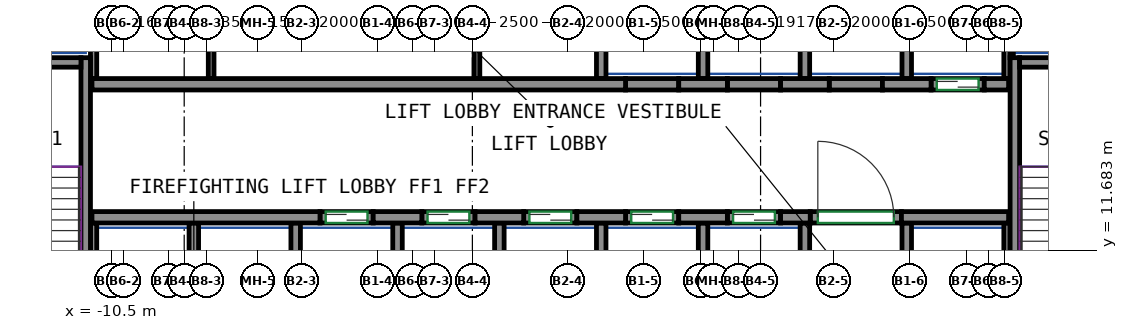
"""IFC4 building model, lengths in metres.
Left out: names, types, materials, properties, quantities, classifications, styles, units other than length and angle.
Written with IfcOpenShell. Run it as: python <this file> out.ifc"""

import sys

from ifc_helpers import new_model, si_unit, direction, frame, frame_2d, origin, place, context, subcontext, project, spatial, rectangle, extrude, source, transform, mapped, element, fill, save


model = new_model("IFC4")
c1 = context("Model", 3, precision=1e-05, world=origin(), true_north=direction((0.0, 1.0)))
c2 = subcontext(c1, "Body", "Model", "MODEL_VIEW")
j1 = project(units=[si_unit("LENGTHUNIT", "METRE"), si_unit("PLANEANGLEUNIT", "RADIAN")], contexts=[c1])
p1 = place(None, origin())
s1 = spatial("IfcSite", under=j1, at=p1, CompositionType="ELEMENT")
p2 = place(p1, origin())
s2 = spatial("IfcBuilding", under=s1, at=p2, CompositionType="ELEMENT")
p3 = place(p2, frame((0.0, 0.0, 164.3)))
s3 = spatial("IfcBuildingStorey", under=s2, at=p3, CompositionType="ELEMENT", Elevation=164.3)
m1 = source(origin(), c2, "Body", "SweptSolid", [
    extrude(rectangle(XDim=7.75, YDim=0.25, at=frame_2d((3.875, 0.0))), origin(), (0.0, 0.0, 1.0), 3.8),
])
p4 = place(p3, frame((-11.175, 9.0, 0.0), z_axis=(0.0, 0.0, 1.0), x_axis=(0.0, 1.0, 0.0)))
e1 = element("IfcWall", 1, at=p4, inside=s3, PredefinedType="SHEAR", context=c2, shape_type="MappedRepresentation", body=[
    mapped(m1, transform((0.0, 0.0, 0.0))),
])
m2 = source(origin(), c2, "Body", "SweptSolid", [
    extrude(rectangle(XDim=3.7, YDim=0.25, at=frame_2d((1.85, 0.0))), origin(), (0.0, 0.0, 1.0), 3.8),
])
p5 = place(p3, frame((-15.0, 16.625, 0.0), z_axis=(0.0, 0.0, 1.0), x_axis=(1.0, 0.0, 0.0)))
e2 = element("IfcWall", 2, at=p5, inside=s3, PredefinedType="SHEAR", context=c2, shape_type="MappedRepresentation", body=[
    mapped(m2, transform((0.0, 0.0, 0.0))),
])
p6 = place(p3, frame((13.275, 9.0, 0.0), z_axis=(0.0, 0.0, 1.0), x_axis=(0.0, 1.0, 0.0)))
e3 = element("IfcWall", 3, at=p6, inside=s3, PredefinedType="SHEAR", context=c2, shape_type="MappedRepresentation", body=[
    mapped(m1, transform((0.0, 0.0, 0.0))),
])
m3 = source(origin(), c2, "Body", "SweptSolid", [
    extrude(rectangle(XDim=3.7, YDim=0.25, at=frame_2d((1.85, 0.0))), origin(), (0.0, 0.0, 1.0), 3.8),
])
p7 = place(p3, frame((13.4, 16.625, 0.0), z_axis=(0.0, 0.0, 1.0), x_axis=(1.0, 0.0, 0.0)))
e4 = element("IfcWall", 4, at=p7, inside=s3, PredefinedType="SHEAR", context=c2, shape_type="MappedRepresentation", body=[
    mapped(m3, transform((0.0, 0.0, 0.0))),
])
m4 = source(origin(), c2, "Body", "SweptSolid", [
    extrude(rectangle(XDim=6.0, YDim=0.3, at=frame_2d((3.0, 0.0))), origin(), (0.0, 0.0, 1.0), 3.8),
])
p8 = place(p3, frame((-11.01, 12.55, 0.0), z_axis=(0.0, 0.0, 1.0), x_axis=(1.0, 0.0, 0.0)))
e5 = element("IfcWall", 5, at=p8, inside=s3, PredefinedType="SHEAR", context=c2, shape_type="MappedRepresentation", body=[
    mapped(m4, transform((0.0, 0.0, 0.0))),
])
m5 = source(origin(), c2, "Body", "SweptSolid", [
    extrude(rectangle(XDim=1.28, YDim=0.3, at=frame_2d((0.64, 0.0))), origin(), (0.0, 0.0, 1.0), 3.8),
])
for number, where, z_axis, x_axis in (
    (6, (-3.61, 12.55, 0.0), (0.0, 0.0, 1.0), (1.0, 0.0, 0.0)),
    (7, (-0.93, 12.55, 0.0), (0.0, 0.0, 1.0), (1.0, 0.0, 0.0)),
    (8, (1.75, 12.55, 0.0), (0.0, 0.0, 1.0), (1.0, 0.0, 0.0)),
    (9, (4.43, 12.55, 0.0), (0.0, 0.0, 1.0), (1.0, 0.0, 0.0)),
):
    element("IfcWall", number, at=place(p3, frame(where, z_axis=z_axis, x_axis=x_axis)), inside=s3, PredefinedType="SHEAR", context=c2, shape_type="MappedRepresentation", body=[
        mapped(m5, transform((0.0, 0.0, 0.0))),
    ])
m6 = source(origin(), c2, "Body", "SweptSolid", [
    extrude(rectangle(XDim=0.78, YDim=0.3, at=frame_2d((0.39, 0.0))), origin(), (0.0, 0.0, 1.0), 3.8),
])
p9 = place(p3, frame((7.11, 12.55, 0.0), z_axis=(0.0, 0.0, 1.0), x_axis=(1.0, 0.0, 0.0)))
e10 = element("IfcWall", 10, at=p9, inside=s3, PredefinedType="SHEAR", context=c2, shape_type="MappedRepresentation", body=[
    mapped(m6, transform((0.0, 0.0, 0.0))),
])
m7 = source(origin(), c2, "Body", "SweptSolid", [
    extrude(rectangle(XDim=2.82, YDim=0.3, at=frame_2d((1.41, 0.0))), origin(), (0.0, 0.0, 1.0), 3.8),
])
p10 = place(p3, frame((10.29, 12.55, 0.0), z_axis=(0.0, 0.0, 1.0), x_axis=(1.0, 0.0, 0.0)))
e11 = element("IfcWall", 11, at=p10, inside=s3, PredefinedType="SHEAR", context=c2, shape_type="MappedRepresentation", body=[
    mapped(m7, transform((0.0, 0.0, 0.0))),
])
m8 = source(origin(), c2, "Body", "SweptSolid", [
    extrude(rectangle(XDim=14.04, YDim=0.3, at=frame_2d((7.02, 0.0))), origin(), (0.0, 0.0, 1.0), 3.8),
])
p11 = place(p3, frame((-11.01, 16.05, 0.0), z_axis=(0.0, 0.0, 1.0), x_axis=(1.0, 0.0, 0.0)))
e12 = element("IfcWall", 12, at=p11, inside=s3, PredefinedType="SHEAR", context=c2, shape_type="MappedRepresentation", body=[
    mapped(m8, transform((0.0, 0.0, 0.0))),
])
p12 = place(p3, frame((4.43, 16.05, 0.0), z_axis=(0.0, 0.0, 1.0), x_axis=(1.0, 0.0, 0.0)))
e13 = element("IfcWall", 13, at=p12, inside=s3, PredefinedType="SHEAR", context=c2, shape_type="MappedRepresentation", body=[
    mapped(m5, transform((0.0, 0.0, 0.0))),
])
m9 = source(origin(), c2, "Body", "SweptSolid", [
    extrude(rectangle(XDim=1.28, YDim=0.3, at=frame_2d((0.64, 0.0))), origin(), (0.0, 0.0, 1.0), 3.8),
])
p13 = place(p3, frame((7.11, 16.05, 0.0), z_axis=(0.0, 0.0, 1.0), x_axis=(1.0, 0.0, 0.0)))
e14 = element("IfcWall", 14, at=p13, inside=s3, PredefinedType="SHEAR", context=c2, shape_type="MappedRepresentation", body=[
    mapped(m9, transform((0.0, 0.0, 0.0))),
])
p14 = place(p3, frame((9.79, 16.05, 0.0), z_axis=(0.0, 0.0, 1.0), x_axis=(1.0, 0.0, 0.0)))
e15 = element("IfcWall", 15, at=p14, inside=s3, PredefinedType="SHEAR", context=c2, shape_type="MappedRepresentation", body=[
    mapped(m5, transform((0.0, 0.0, 0.0))),
])
m10 = source(origin(), c2, "Body", "SweptSolid", [
    extrude(rectangle(XDim=0.64, YDim=0.3, at=frame_2d((0.32, 0.0))), origin(), (0.0, 0.0, 1.0), 3.8),
])
p15 = place(p3, frame((12.47, 16.05, 0.0), z_axis=(0.0, 0.0, 1.0), x_axis=(1.0, 0.0, 0.0)))
e16 = element("IfcWall", 16, at=p15, inside=s3, PredefinedType="SHEAR", context=c2, shape_type="MappedRepresentation", body=[
    mapped(m10, transform((0.0, 0.0, 0.0))),
])
m11 = source(origin(), c2, "Body", "SweptSolid", [
    extrude(rectangle(XDim=1.4, YDim=0.3, at=frame_2d((0.7, 0.0))), origin(), (0.0, 0.0, 1.0), 3.8),
])
p16 = place(p3, frame((-5.01, 12.55, 0.0), z_axis=(0.0, 0.0, 1.0), x_axis=(1.0, 0.0, 0.0)))
e17 = element("IfcWall", 17, at=p16, inside=s3, PredefinedType="PARTITIONING", context=c2, shape_type="MappedRepresentation", body=[
    mapped(m11, transform((0.0, 0.0, 0.0))),
])
p17 = place(p16, frame((0.15, 0.0, 0.0)))
e18 = element("IfcOpeningElement", 18, at=p17, cuts=e17, PredefinedType="OPENING", context=c2, shape_type="SweptSolid", body=[
    extrude(rectangle(XDim=1.1, YDim=2.1, at=frame_2d((0.55, 1.05))), frame((0.0, 0.16, 0.0), z_axis=(0.0, -1.0, 0.0), x_axis=(1.0, 0.0, 0.0)), (0.0, 0.0, 1.0), 0.32),
])
m12 = source(origin(), c2, "Body", "SweptSolid", [
    extrude(rectangle(XDim=1.4, YDim=0.3, at=frame_2d((0.7, 0.0))), origin(), (0.0, 0.0, 1.0), 3.8),
])
p18 = place(p3, frame((-2.33, 12.55, 0.0), z_axis=(0.0, 0.0, 1.0), x_axis=(1.0, 0.0, 0.0)))
e19 = element("IfcWall", 19, at=p18, inside=s3, PredefinedType="PARTITIONING", context=c2, shape_type="MappedRepresentation", body=[
    mapped(m12, transform((0.0, 0.0, 0.0))),
])
p19 = place(p18, frame((0.15, 0.0, 0.0)))
e20 = element("IfcOpeningElement", 20, at=p19, cuts=e19, PredefinedType="OPENING", context=c2, shape_type="SweptSolid", body=[
    extrude(rectangle(XDim=1.1, YDim=2.1, at=frame_2d((0.55, 1.05))), frame((0.0, 0.16, 0.0), z_axis=(0.0, -1.0, 0.0), x_axis=(1.0, 0.0, 0.0)), (0.0, 0.0, 1.0), 0.32),
])
p20 = place(p3, frame((0.35, 12.55, 0.0), z_axis=(0.0, 0.0, 1.0), x_axis=(1.0, 0.0, 0.0)))
e21 = element("IfcWall", 21, at=p20, inside=s3, PredefinedType="PARTITIONING", context=c2, shape_type="MappedRepresentation", body=[
    mapped(m11, transform((0.0, 0.0, 0.0))),
])
p21 = place(p20, frame((0.15, 0.0, 0.0)))
e22 = element("IfcOpeningElement", 22, at=p21, cuts=e21, PredefinedType="OPENING", context=c2, shape_type="SweptSolid", body=[
    extrude(rectangle(XDim=1.1, YDim=2.1, at=frame_2d((0.55, 1.05))), frame((0.0, 0.16, 0.0), z_axis=(0.0, -1.0, 0.0), x_axis=(1.0, 0.0, 0.0)), (0.0, 0.0, 1.0), 0.32),
])
p22 = place(p3, frame((3.03, 12.55, 0.0), z_axis=(0.0, 0.0, 1.0), x_axis=(1.0, 0.0, 0.0)))
e23 = element("IfcWall", 23, at=p22, inside=s3, PredefinedType="PARTITIONING", context=c2, shape_type="MappedRepresentation", body=[
    mapped(m11, transform((0.0, 0.0, 0.0))),
])
p23 = place(p22, frame((0.15, 0.0, 0.0)))
e24 = element("IfcOpeningElement", 24, at=p23, cuts=e23, PredefinedType="OPENING", context=c2, shape_type="SweptSolid", body=[
    extrude(rectangle(XDim=1.1, YDim=2.1, at=frame_2d((0.55, 1.05))), frame((0.0, 0.16, 0.0), z_axis=(0.0, -1.0, 0.0), x_axis=(1.0, 0.0, 0.0)), (0.0, 0.0, 1.0), 0.32),
])
p24 = place(p3, frame((5.71, 12.55, 0.0), z_axis=(0.0, 0.0, 1.0), x_axis=(1.0, 0.0, 0.0)))
e25 = element("IfcWall", 25, at=p24, inside=s3, PredefinedType="PARTITIONING", context=c2, shape_type="MappedRepresentation", body=[
    mapped(m12, transform((0.0, 0.0, 0.0))),
])
p25 = place(p24, frame((0.15, 0.0, 0.0)))
e26 = element("IfcOpeningElement", 26, at=p25, cuts=e25, PredefinedType="OPENING", context=c2, shape_type="SweptSolid", body=[
    extrude(rectangle(XDim=1.1, YDim=2.1, at=frame_2d((0.55, 1.05))), frame((0.0, 0.16, 0.0), z_axis=(0.0, -1.0, 0.0), x_axis=(1.0, 0.0, 0.0)), (0.0, 0.0, 1.0), 0.32),
])
p26 = place(p3, frame((11.07, 16.05, 0.0), z_axis=(0.0, 0.0, 1.0), x_axis=(1.0, 0.0, 0.0)))
e27 = element("IfcWall", 27, at=p26, inside=s3, PredefinedType="PARTITIONING", context=c2, shape_type="MappedRepresentation", body=[
    mapped(m11, transform((0.0, 0.0, 0.0))),
])
p27 = place(p26, frame((0.15, 0.0, 0.0)))
e28 = element("IfcOpeningElement", 28, at=p27, cuts=e27, PredefinedType="OPENING", context=c2, shape_type="SweptSolid", body=[
    extrude(rectangle(XDim=1.1, YDim=2.1, at=frame_2d((0.55, 1.05))), frame((0.0, 0.16, 0.0), z_axis=(0.0, -1.0, 0.0), x_axis=(1.0, 0.0, 0.0)), (0.0, 0.0, 1.0), 0.32),
])
m13 = source(origin(), c2, "Body", "SweptSolid", [
    extrude(rectangle(XDim=2.4, YDim=0.3, at=frame_2d((1.2, 0.0))), origin(), (0.0, 0.0, 1.0), 3.8),
])
p28 = place(p3, frame((7.89, 12.55, 0.0), z_axis=(0.0, 0.0, 1.0), x_axis=(1.0, 0.0, 0.0)))
e29 = element("IfcWall", 29, at=p28, inside=s3, PredefinedType="PARTITIONING", context=c2, shape_type="MappedRepresentation", body=[
    mapped(m13, transform((0.0, 0.0, 0.0))),
])
p29 = place(p28, frame((0.2, 0.0, 0.0)))
e30 = element("IfcOpeningElement", 30, at=p29, cuts=e29, PredefinedType="OPENING", context=c2, shape_type="SweptSolid", body=[
    extrude(rectangle(XDim=2.0, YDim=2.1, at=frame_2d((1.0, 1.05))), frame((0.0, 0.16, 0.0), z_axis=(0.0, -1.0, 0.0), x_axis=(1.0, 0.0, 0.0)), (0.0, 0.0, 1.0), 0.32),
])
p30 = place(p3, frame((3.03, 16.05, 0.0), z_axis=(0.0, 0.0, 1.0), x_axis=(1.0, 0.0, 0.0)))
e31 = element("IfcWall", 31, at=p30, inside=s3, PredefinedType="PARTITIONING", context=c2, shape_type="MappedRepresentation", body=[
    mapped(m11, transform((0.0, 0.0, 0.0))),
])
for number, where, z_axis, x_axis in (
    (32, (5.71, 16.05, 0.0), (0.0, 0.0, 1.0), (1.0, 0.0, 0.0)),
    (33, (8.39, 16.05, 0.0), (0.0, 0.0, 1.0), (1.0, 0.0, 0.0)),
):
    element("IfcWall", number, at=place(p3, frame(where, z_axis=z_axis, x_axis=x_axis)), inside=s3, PredefinedType="PARTITIONING", context=c2, shape_type="MappedRepresentation", body=[
        mapped(m12, transform((0.0, 0.0, 0.0))),
    ])
m14 = source(origin(), c2, "Body", "SweptSolid", [
    extrude(rectangle(XDim=3.275, YDim=0.165, at=frame_2d((1.638, 0.0))), origin(), (0.0, 0.0, 1.0), 3.8),
])
p31 = place(p3, frame((13.067, 16.2, 0.0), z_axis=(0.0, 0.0, 1.0), x_axis=(0.0, 1.0, 0.0)))
e34 = element("IfcWall", 34, at=p31, inside=s3, PredefinedType="PARTITIONING", context=c2, shape_type="MappedRepresentation", body=[
    mapped(m14, transform((0.0, 0.0, 0.0))),
])
m15 = source(origin(), c2, "Body", "SweptSolid", [
    extrude(rectangle(XDim=4.8, YDim=0.165, at=frame_2d((2.4, 0.0))), origin(), (0.0, 0.0, 1.0), 3.8),
])
p32 = place(p3, frame((-10.968, 16.2, 0.0), z_axis=(0.0, 0.0, 1.0), x_axis=(0.0, 1.0, 0.0)))
e35 = element("IfcWall", 35, at=p32, inside=s3, PredefinedType="PARTITIONING", context=c2, shape_type="MappedRepresentation", body=[
    mapped(m15, transform((0.0, 0.0, 0.0))),
])
m16 = source(origin(), c2, "Body", "SweptSolid", [
    extrude(rectangle(XDim=3.275, YDim=0.25, at=frame_2d((1.638, 0.0))), origin(), (0.0, 0.0, 1.0), 3.8),
])
p33 = place(p3, frame((10.43, 16.2, 0.0), z_axis=(0.0, 0.0, 1.0), x_axis=(0.0, 1.0, 0.0)))
e36 = element("IfcWall", 36, at=p33, inside=s3, PredefinedType="PARTITIONING", context=c2, shape_type="MappedRepresentation", body=[
    mapped(m16, transform((0.0, 0.0, 0.0))),
])
m17 = source(origin(), c2, "Body", "SweptSolid", [
    extrude(rectangle(XDim=2.725, YDim=0.085, at=frame_2d((1.363, 0.0))), origin(), (0.0, 0.0, 1.0), 3.8),
])
p34 = place(p3, frame((13.192, 16.75, 0.0), z_axis=(0.0, 0.0, 1.0), x_axis=(0.0, 1.0, 0.0)))
e37 = element("IfcWall", 37, at=p34, inside=s3, PredefinedType="PARTITIONING", context=c2, shape_type="MappedRepresentation", body=[
    mapped(m17, transform((0.0, 0.0, 0.0))),
])
for number, where, z_axis, x_axis in (
    (38, (2.39, 16.2, 0.0), (0.0, 0.0, 1.0), (0.0, 1.0, 0.0)),
    (39, (5.07, 16.2, 0.0), (0.0, 0.0, 1.0), (0.0, 1.0, 0.0)),
    (40, (7.75, 16.2, 0.0), (0.0, 0.0, 1.0), (0.0, 1.0, 0.0)),
):
    element("IfcWall", number, at=place(p3, frame(where, z_axis=z_axis, x_axis=x_axis)), inside=s3, PredefinedType="PARTITIONING", context=c2, shape_type="MappedRepresentation", body=[
        mapped(m16, transform((0.0, 0.0, 0.0))),
    ])
m18 = source(origin(), c2, "Body", "SweptSolid", [
    extrude(rectangle(XDim=3.4, YDim=0.25, at=frame_2d((1.7, 0.0))), origin(), (0.0, 0.0, 1.0), 3.8),
])
p35 = place(p3, frame((10.43, 9.0, 0.0), z_axis=(0.0, 0.0, 1.0), x_axis=(0.0, 1.0, 0.0)))
e41 = element("IfcWall", 41, at=p35, inside=s3, PredefinedType="PARTITIONING", context=c2, shape_type="MappedRepresentation", body=[
    mapped(m18, transform((0.0, 0.0, 0.0))),
])
m19 = source(origin(), c2, "Body", "SweptSolid", [
    extrude(rectangle(XDim=3.4, YDim=0.165, at=frame_2d((1.7, 0.0))), origin(), (0.0, 0.0, 1.0), 3.8),
])
p36 = place(p3, frame((13.067, 9.0, 0.0), z_axis=(0.0, 0.0, 1.0), x_axis=(0.0, 1.0, 0.0)))
e42 = element("IfcWall", 42, at=p36, inside=s3, PredefinedType="PARTITIONING", context=c2, shape_type="MappedRepresentation", body=[
    mapped(m19, transform((0.0, 0.0, 0.0))),
])
for number, where, z_axis, x_axis in (
    (43, (2.39, 9.0, 0.0), (0.0, 0.0, 1.0), (0.0, 1.0, 0.0)),
    (44, (5.07, 9.0, 0.0), (0.0, 0.0, 1.0), (0.0, 1.0, 0.0)),
    (45, (7.75, 9.0, 0.0), (0.0, 0.0, 1.0), (0.0, 1.0, 0.0)),
    (46, (-0.29, 9.0, 0.0), (0.0, 0.0, 1.0), (0.0, 1.0, 0.0)),
):
    element("IfcWall", number, at=place(p3, frame(where, z_axis=z_axis, x_axis=x_axis)), inside=s3, PredefinedType="PARTITIONING", context=c2, shape_type="MappedRepresentation", body=[
        mapped(m18, transform((0.0, 0.0, 0.0))),
    ])
p37 = place(p3, frame((-10.968, 9.0, 0.0), z_axis=(0.0, 0.0, 1.0), x_axis=(0.0, 1.0, 0.0)))
e47 = element("IfcWall", 47, at=p37, inside=s3, PredefinedType="PARTITIONING", context=c2, shape_type="MappedRepresentation", body=[
    mapped(m19, transform((0.0, 0.0, 0.0))),
])
for number, where, z_axis, x_axis in (
    (48, (-2.97, 9.0, 0.0), (0.0, 0.0, 1.0), (0.0, 1.0, 0.0)),
    (49, (-5.65, 9.0, 0.0), (0.0, 0.0, 1.0), (0.0, 1.0, 0.0)),
    (50, (-8.33, 9.0, 0.0), (0.0, 0.0, 1.0), (0.0, 1.0, 0.0)),
):
    element("IfcWall", number, at=place(p3, frame(where, z_axis=z_axis, x_axis=x_axis)), inside=s3, PredefinedType="PARTITIONING", context=c2, shape_type="MappedRepresentation", body=[
        mapped(m18, transform((0.0, 0.0, 0.0))),
    ])
m20 = source(origin(), c2, "Body", "SweptSolid", [
    extrude(rectangle(XDim=4.8, YDim=0.15, at=frame_2d((2.4, 0.0))), origin(), (0.0, 0.0, 1.0), 3.8),
])
for number, where, z_axis, x_axis in (
    (51, (-7.875, 16.2, 0.0), (0.0, 0.0, 1.0), (0.0, 1.0, 0.0)),
    (52, (-0.88, 16.2, 0.0), (0.0, 0.0, 1.0), (0.0, 1.0, 0.0)),
):
    element("IfcWall", number, at=place(p3, frame(where, z_axis=z_axis, x_axis=x_axis)), inside=s3, PredefinedType="PARTITIONING", context=c2, shape_type="MappedRepresentation", body=[
        mapped(m20, transform((0.0, 0.0, 0.0))),
    ])
p38 = place(p29, origin())
e53 = element("IfcDoor", 53, at=p38, inside=s3, OperationType="DOUBLE_DOOR_SINGLE_SWING", PredefinedType="DOOR", context=c2, shape_type="SweptSolid", body=[
    extrude(rectangle(XDim=2.0, YDim=2.1, at=frame_2d((1.0, 1.05))), frame((0.0, 0.025, 0.0), z_axis=(0.0, -1.0, 0.0), x_axis=(1.0, 0.0, 0.0)), (0.0, 0.0, 1.0), 0.05),
])
fill(e30, e53)
p39 = place(p17, origin())
e54 = element("IfcDoor", 54, at=p39, inside=s3, OperationType="DOUBLE_DOOR_SLIDING", PredefinedType="DOOR", context=c2, shape_type="SweptSolid", body=[
    extrude(rectangle(XDim=1.1, YDim=2.1, at=frame_2d((0.55, 1.05))), frame((0.0, 0.025, 0.0), z_axis=(0.0, -1.0, 0.0), x_axis=(1.0, 0.0, 0.0)), (0.0, 0.0, 1.0), 0.05),
])
fill(e18, e54)
p40 = place(p19, origin())
e55 = element("IfcDoor", 55, at=p40, inside=s3, OperationType="DOUBLE_DOOR_SLIDING", PredefinedType="DOOR", context=c2, shape_type="SweptSolid", body=[
    extrude(rectangle(XDim=1.1, YDim=2.1, at=frame_2d((0.55, 1.05))), frame((0.0, 0.025, 0.0), z_axis=(0.0, -1.0, 0.0), x_axis=(1.0, 0.0, 0.0)), (0.0, 0.0, 1.0), 0.05),
])
fill(e20, e55)
p41 = place(p21, origin())
e56 = element("IfcDoor", 56, at=p41, inside=s3, OperationType="DOUBLE_DOOR_SLIDING", PredefinedType="DOOR", context=c2, shape_type="SweptSolid", body=[
    extrude(rectangle(XDim=1.1, YDim=2.1, at=frame_2d((0.55, 1.05))), frame((0.0, 0.025, 0.0), z_axis=(0.0, -1.0, 0.0), x_axis=(1.0, 0.0, 0.0)), (0.0, 0.0, 1.0), 0.05),
])
fill(e22, e56)
p42 = place(p23, origin())
e57 = element("IfcDoor", 57, at=p42, inside=s3, OperationType="DOUBLE_DOOR_SLIDING", PredefinedType="DOOR", context=c2, shape_type="SweptSolid", body=[
    extrude(rectangle(XDim=1.1, YDim=2.1, at=frame_2d((0.55, 1.05))), frame((0.0, 0.025, 0.0), z_axis=(0.0, -1.0, 0.0), x_axis=(1.0, 0.0, 0.0)), (0.0, 0.0, 1.0), 0.05),
])
fill(e24, e57)
p43 = place(p25, origin())
e58 = element("IfcDoor", 58, at=p43, inside=s3, OperationType="DOUBLE_DOOR_SLIDING", PredefinedType="DOOR", context=c2, shape_type="SweptSolid", body=[
    extrude(rectangle(XDim=1.1, YDim=2.1, at=frame_2d((0.55, 1.05))), frame((0.0, 0.025, 0.0), z_axis=(0.0, -1.0, 0.0), x_axis=(1.0, 0.0, 0.0)), (0.0, 0.0, 1.0), 0.05),
])
fill(e26, e58)
p44 = place(p27, origin())
e59 = element("IfcDoor", 59, at=p44, inside=s3, OperationType="DOUBLE_DOOR_SLIDING", PredefinedType="DOOR", context=c2, shape_type="SweptSolid", body=[
    extrude(rectangle(XDim=1.1, YDim=2.1, at=frame_2d((0.55, 1.05))), frame((0.0, 0.025, 0.0), z_axis=(0.0, -1.0, 0.0), x_axis=(1.0, 0.0, 0.0)), (0.0, 0.0, 1.0), 0.05),
])
fill(e28, e59)
save(model, sys.argv[1])
